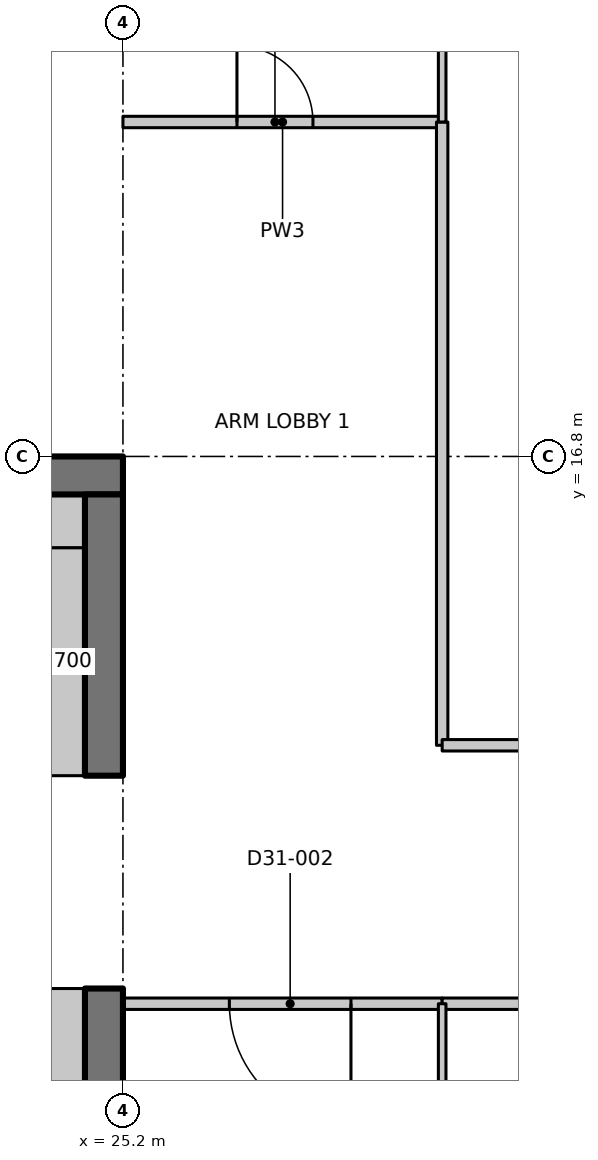
"""IFC4 building model, lengths in metres.
Left out: names, types, materials, properties, quantities, classifications, styles, units other than length and angle.
Written with IfcOpenShell. Run it as: python <this file> out.ifc"""

import sys

from ifc_helpers import new_model, si_unit, direction, frame, frame_2d, origin, place, context, subcontext, project, spatial, polyline, rectangle, outline, extrude, element, fill, save


model = new_model("IFC4")
c1 = context("Model", 3, precision=1e-05, world=origin(), true_north=direction((0.0, 1.0)))
c2 = subcontext(c1, "Body", "Model", "MODEL_VIEW")
j1 = project(units=[si_unit("LENGTHUNIT", "METRE"), si_unit("PLANEANGLEUNIT", "RADIAN")], contexts=[c1])
p1 = place(None, origin())
s1 = spatial("IfcSite", under=j1, at=p1, CompositionType="ELEMENT")
p2 = place(p1, origin())
s2 = spatial("IfcBuilding", under=s1, at=p2, CompositionType="ELEMENT")
p3 = place(p2, frame((0.0, 0.0, 251.7)))
s3 = spatial("IfcBuildingStorey", under=s2, at=p3, CompositionType="ELEMENT", Elevation=251.7)
p4 = place(p3, frame((23.8, 16.55, 0.0), z_axis=(0.0, 0.0, 1.0), x_axis=(1.0, 0.0, 0.0)))
e1 = element("IfcWall", 1, at=p4, inside=s3, PredefinedType="SHEAR", context=c2, shape_type="SweptSolid", body=[
    extrude(rectangle(XDim=1.4, YDim=0.5, at=frame_2d((0.7, 0.0))), origin(), (0.0, 0.0, 1.0), 4.05),
])
p5 = place(p3, frame((24.95, 0.5, 0.0), z_axis=(0.0, 0.0, 1.0), x_axis=(0.0, 1.0, 0.0)))
e2 = element("IfcWall", 2, at=p5, inside=s3, PredefinedType="SHEAR", context=c2, shape_type="SweptSolid", body=[
    extrude(rectangle(XDim=9.3, YDim=0.5, at=frame_2d((4.65, 0.0))), origin(), (0.0, 0.0, 1.0), 4.05),
])
p6 = place(p3, frame((24.95, 12.6, 0.0), z_axis=(0.0, 0.0, 1.0), x_axis=(0.0, 1.0, 0.0)))
e3 = element("IfcWall", 3, at=p6, inside=s3, PredefinedType="SHEAR", context=c2, shape_type="SweptSolid", body=[
    extrude(rectangle(XDim=3.7, YDim=0.5, at=frame_2d((1.85, 0.0))), origin(), (0.0, 0.0, 1.0), 4.05),
])
p7 = place(p3, frame((24.35, 12.6, 0.0), z_axis=(0.0, 0.0, 1.0), x_axis=(0.0, 1.0, 0.0)))
e4 = element("IfcWall", 4, at=p7, inside=s3, PredefinedType="PARTITIONING", context=c2, shape_type="SweptSolid", body=[
    extrude(rectangle(XDim=3.0, YDim=0.7, at=frame_2d((1.5, 0.0))), origin(), (0.0, 0.0, 1.0), 4.05),
])
p8 = place(p3, frame((23.8, 15.95, 0.0), z_axis=(0.0, 0.0, 1.0), x_axis=(1.0, 0.0, 0.0)))
e5 = element("IfcWall", 5, at=p8, inside=s3, PredefinedType="PARTITIONING", context=c2, shape_type="SweptSolid", body=[
    extrude(rectangle(XDim=0.9, YDim=0.7, at=frame_2d((0.45, 0.0))), origin(), (0.0, 0.0, 1.0), 4.05),
])
p9 = place(p3, frame((24.35, 4.35, 0.0), z_axis=(0.0, 0.0, 1.0), x_axis=(0.0, 1.0, 0.0)))
e6 = element("IfcWall", 6, at=p9, inside=s3, PredefinedType="PARTITIONING", context=c2, shape_type="SweptSolid", body=[
    extrude(rectangle(XDim=5.45, YDim=0.7, at=frame_2d((2.725, 0.0))), origin(), (0.0, 0.0, 1.0), 4.05),
])
p10 = place(p3, frame((25.2, 21.2, 0.0), z_axis=(0.0, 0.0, 1.0), x_axis=(1.0, 0.0, 0.0)))
e7 = element("IfcWall", 7, at=p10, inside=s3, PredefinedType="PARTITIONING", context=c2, shape_type="SweptSolid", body=[
    extrude(rectangle(XDim=4.2, YDim=0.15, at=frame_2d((2.1, 0.0))), origin(), (0.0, 0.0, 1.0), 4.03),
])
p11 = place(p10, frame((1.5, 0.0, 0.0)))
e8 = element("IfcOpeningElement", 8, at=p11, cuts=e7, PredefinedType="OPENING", context=c2, shape_type="SweptSolid", body=[
    extrude(rectangle(XDim=1.0, YDim=2.1, at=frame_2d((0.5, 1.05))), frame((0.0, 0.085, 0.0), z_axis=(0.0, -1.0, 0.0), x_axis=(1.0, 0.0, 0.0)), (0.0, 0.0, 1.0), 0.17),
])
p12 = place(p3, frame((29.4, 9.6, 0.0), z_axis=(0.0, 0.0, 1.0), x_axis=(-1.0, 0.0, 0.0)))
e9 = element("IfcWall", 9, at=p12, inside=s3, PredefinedType="PARTITIONING", context=c2, shape_type="SweptSolid", body=[
    extrude(rectangle(XDim=4.2, YDim=0.15, at=frame_2d((2.1, 0.0))), origin(), (0.0, 0.0, 1.0), 4.03),
])
p13 = place(p12, frame((1.2, 0.0, 0.0)))
e10 = element("IfcOpeningElement", 10, at=p13, cuts=e9, PredefinedType="OPENING", context=c2, shape_type="SweptSolid", body=[
    extrude(rectangle(XDim=1.6, YDim=2.1, at=frame_2d((0.8, 1.05))), frame((0.0, 0.085, 0.0), z_axis=(0.0, -1.0, 0.0), x_axis=(1.0, 0.0, 0.0)), (0.0, 0.0, 1.0), 0.17),
])
p14 = place(p3, frame((29.4, 21.2, 0.0), z_axis=(0.0, 0.0, 1.0), x_axis=(0.0, -1.0, 0.0)))
e11 = element("IfcWall", 11, at=p14, inside=s3, PredefinedType="PARTITIONING", context=c2, shape_type="SweptSolid", body=[
    extrude(rectangle(XDim=8.2, YDim=0.15, at=frame_2d((4.1, 0.0))), origin(), (0.0, 0.0, 1.0), 4.03),
])
p15 = place(p3, frame((29.4, 27.423, 0.0), z_axis=(0.0, 0.0, 1.0), x_axis=(0.0, -1.0, 0.0)))
e12 = element("IfcWall", 12, at=p15, inside=s3, PredefinedType="PARTITIONING", context=c2, shape_type="SweptSolid", body=[
    extrude(outline(polyline([(0.0, 0.0), (6.223, 0.0), (6.223, 4.03), (2.673, 4.03), (2.671, 3.68), (1.775, 3.68), (1.773, 4.03), (0.148, 4.03), (0.0, 4.03), (0.0, 0.0)])), frame((0.0, 0.05, 0.0), z_axis=(0.0, -1.0, 0.0), x_axis=(1.0, 0.0, 0.0)), (0.0, 0.0, 1.0), 0.1),
])
p16 = place(p3, frame((33.6, 9.6, 0.0), z_axis=(0.0, 0.0, 1.0), x_axis=(-1.0, 0.0, 0.0)))
e13 = element("IfcWall", 13, at=p16, inside=s3, PredefinedType="PARTITIONING", context=c2, shape_type="SweptSolid", body=[
    extrude(rectangle(XDim=4.2, YDim=0.15, at=frame_2d((2.1, 0.0))), origin(), (0.0, 0.0, 1.0), 4.03),
])
p17 = place(p3, frame((29.4, 13.0, 0.0), z_axis=(0.0, 0.0, 1.0), x_axis=(1.0, 0.0, 0.0)))
e14 = element("IfcWall", 14, at=p17, inside=s3, PredefinedType="PARTITIONING", context=c2, shape_type="SweptSolid", body=[
    extrude(rectangle(XDim=8.4, YDim=0.15, at=frame_2d((4.2, 0.0))), origin(), (0.0, 0.0, 1.0), 4.03),
])
p18 = place(p17, frame((3.3, 0.0, 0.0)))
e15 = element("IfcOpeningElement", 15, at=p18, cuts=e14, PredefinedType="OPENING", context=c2, shape_type="SweptSolid", body=[
    extrude(rectangle(XDim=2.0, YDim=2.4, at=frame_2d((1.0, 1.2))), frame((0.0, 0.085, 0.0), z_axis=(0.0, -1.0, 0.0), x_axis=(1.0, 0.0, 0.0)), (0.0, 0.0, 1.0), 0.17),
])
p19 = place(p3, frame((29.4, 9.6, 0.0), z_axis=(0.0, 0.0, 1.0), x_axis=(0.0, -1.0, 0.0)))
e16 = element("IfcWall", 16, at=p19, inside=s3, PredefinedType="PARTITIONING", context=c2, shape_type="SweptSolid", body=[
    extrude(rectangle(XDim=4.8, YDim=0.1, at=frame_2d((2.4, 0.0))), origin(), (0.0, 0.0, 1.0), 4.03),
])
p20 = place(p19, frame((1.8, 0.0, 0.0)))
e17 = element("IfcOpeningElement", 17, at=p20, cuts=e16, PredefinedType="OPENING", context=c2, shape_type="SweptSolid", body=[
    extrude(rectangle(XDim=1.0, YDim=2.1, at=frame_2d((0.5, 1.05))), frame((0.0, 0.06, 0.0), z_axis=(0.0, -1.0, 0.0), x_axis=(1.0, 0.0, 0.0)), (0.0, 0.0, 1.0), 0.12),
])
p21 = place(p11, origin())
e18 = element("IfcDoor", 18, at=p21, inside=s3, OperationType="SINGLE_SWING_LEFT", PredefinedType="DOOR", context=c2, shape_type="SweptSolid", body=[
    extrude(rectangle(XDim=1.0, YDim=2.1, at=frame_2d((0.5, 1.05))), frame((0.0, 0.025, 0.0), z_axis=(0.0, -1.0, 0.0), x_axis=(1.0, 0.0, 0.0)), (0.0, 0.0, 1.0), 0.05),
])
fill(e8, e18)
p22 = place(p13, origin())
e19 = element("IfcDoor", 19, at=p22, inside=s3, OperationType="DOUBLE_DOOR_SINGLE_SWING", PredefinedType="DOOR", context=c2, shape_type="SweptSolid", body=[
    extrude(rectangle(XDim=1.6, YDim=2.1, at=frame_2d((0.8, 1.05))), frame((0.0, 0.025, 0.0), z_axis=(0.0, -1.0, 0.0), x_axis=(1.0, 0.0, 0.0)), (0.0, 0.0, 1.0), 0.05),
])
fill(e10, e19)
save(model, sys.argv[1])
